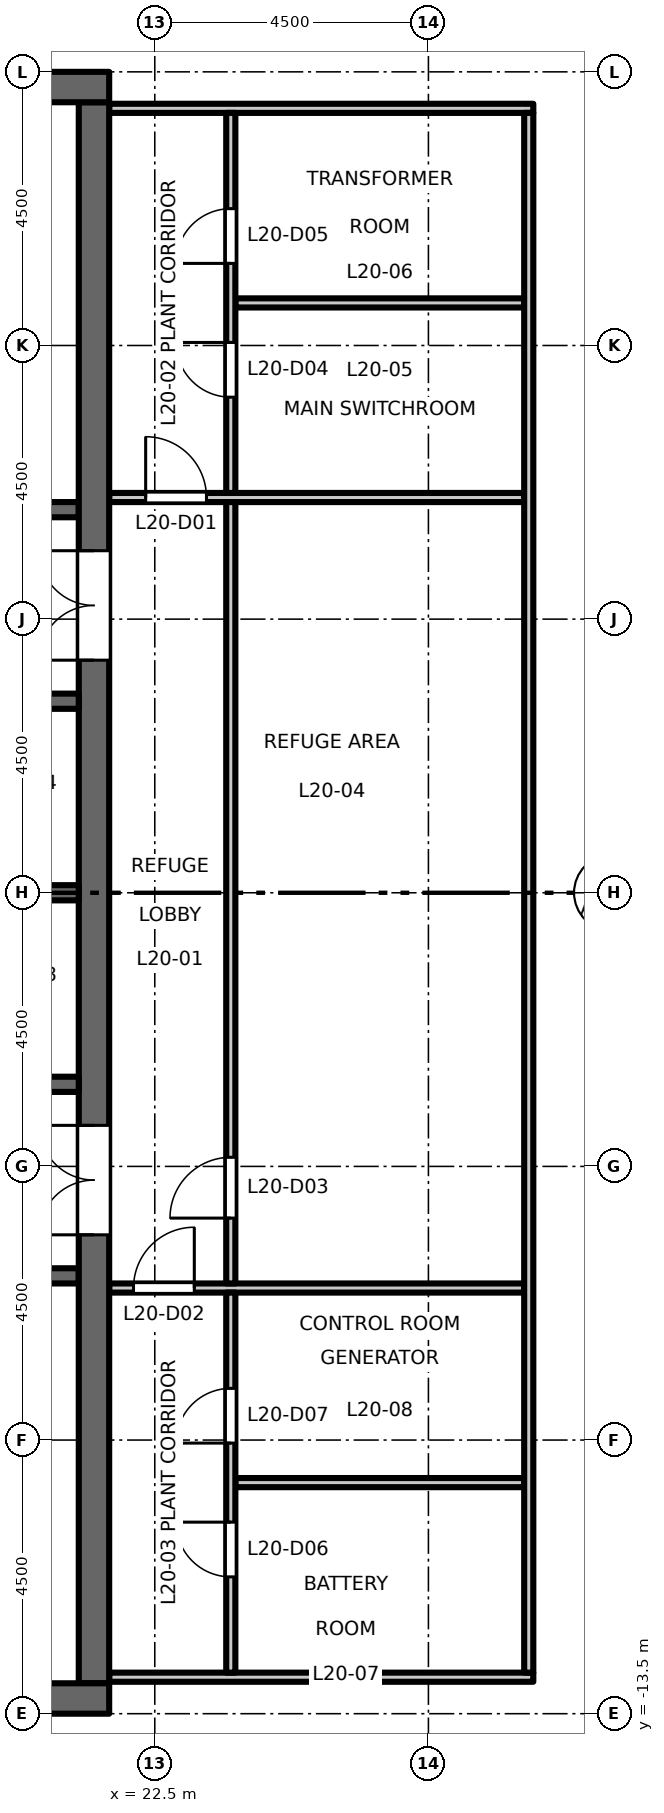
"""IFC4 building model, lengths in metres.
Left out: names, types, materials, properties, quantities, classifications, styles, units other than length and angle.
Written with IfcOpenShell. Run it as: python <this file> out.ifc"""

import sys

from ifc_helpers import new_model, si_unit, direction, frame, frame_2d, origin, place, context, subcontext, project, spatial, rectangle, extrude, element, fill, save


model = new_model("IFC4")
c1 = context("Model", 3, precision=1e-05, world=origin(), true_north=direction((0.0, 1.0)))
c2 = subcontext(c1, "Body", "Model", "MODEL_VIEW")
j1 = project(units=[si_unit("LENGTHUNIT", "METRE"), si_unit("PLANEANGLEUNIT", "RADIAN")], contexts=[c1])
p1 = place(None, origin())
s1 = spatial("IfcSite", under=j1, at=p1, CompositionType="ELEMENT")
p2 = place(p1, origin())
s2 = spatial("IfcBuilding", under=s1, at=p2, CompositionType="ELEMENT")
p3 = place(p2, frame((0.0, 0.0, 94.2)))
s3 = spatial("IfcBuildingStorey", under=s2, at=p3, CompositionType="ELEMENT", Elevation=94.2)
p4 = place(p3, frame((17.0, 6.3, 0.0), z_axis=(0.0, 0.0, 1.0), x_axis=(1.0, 0.0, 0.0)))
e1 = element("IfcWall", 1, at=p4, inside=s3, PredefinedType="SHEAR", context=c2, shape_type="SweptSolid", body=[
    extrude(rectangle(XDim=4.25, YDim=0.25, at=frame_2d((2.125, 0.0))), origin(), (0.0, 0.0, 1.0), 4.8),
])
p5 = place(p4, frame((1.8, 0.0, 0.0)))
e2 = element("IfcOpeningElement", 2, at=p5, cuts=e1, PredefinedType="OPENING", context=c2, shape_type="SweptSolid", body=[
    extrude(rectangle(XDim=0.9, YDim=2.1, at=frame_2d((0.45, 1.05))), frame((0.0, 0.135, 0.0), z_axis=(0.0, -1.0, 0.0), x_axis=(1.0, 0.0, 0.0)), (0.0, 0.0, 1.0), 0.27),
])
p6 = place(p3, frame((12.15, -6.3, 0.0), z_axis=(0.0, 0.0, 1.0), x_axis=(1.0, 0.0, 0.0)))
e3 = element("IfcWall", 3, at=p6, inside=s3, PredefinedType="SHEAR", context=c2, shape_type="SweptSolid", body=[
    extrude(rectangle(XDim=9.1, YDim=0.25, at=frame_2d((4.55, 0.0))), origin(), (0.0, 0.0, 1.0), 4.8),
])
p7 = place(p6, frame((1.8, 0.0, 0.0)))
e4 = element("IfcOpeningElement", 4, at=p7, cuts=e3, PredefinedType="OPENING", context=c2, shape_type="SweptSolid", body=[
    extrude(rectangle(XDim=1.0, YDim=2.1, at=frame_2d((0.5, 1.05))), frame((0.0, 0.135, 0.0), z_axis=(0.0, -1.0, 0.0), x_axis=(1.0, 0.0, 0.0)), (0.0, 0.0, 1.0), 0.27),
])
p8 = place(p6, frame((7.65, 0.0, 0.0)))
e5 = element("IfcOpeningElement", 5, at=p8, cuts=e3, PredefinedType="OPENING", context=c2, shape_type="SweptSolid", body=[
    extrude(rectangle(XDim=0.9, YDim=2.1, at=frame_2d((0.45, 1.05))), frame((0.0, 0.135, 0.0), z_axis=(0.0, -1.0, 0.0), x_axis=(1.0, 0.0, 0.0)), (0.0, 0.0, 1.0), 0.27),
])
p9 = place(p3, frame((21.5, -13.0, 0.0), z_axis=(0.0, 0.0, 1.0), x_axis=(0.0, 1.0, 0.0)))
e6 = element("IfcWall", 6, at=p9, inside=s3, PredefinedType="SHEAR", context=c2, shape_type="SweptSolid", body=[
    extrude(rectangle(XDim=26.0, YDim=0.5, at=frame_2d((13.0, 0.0))), origin(), (0.0, 0.0, 1.0), 4.8),
])
p10 = place(p9, frame((16.825, 0.0, 0.0)))
e7 = element("IfcOpeningElement", 7, at=p10, cuts=e6, PredefinedType="OPENING", context=c2, shape_type="SweptSolid", body=[
    extrude(rectangle(XDim=1.8, YDim=2.1, at=frame_2d((0.9, 1.05))), frame((0.0, 0.26, 0.0), z_axis=(0.0, -1.0, 0.0), x_axis=(1.0, 0.0, 0.0)), (0.0, 0.0, 1.0), 0.52),
])
p11 = place(p9, frame((7.375, 0.0, 0.0)))
e8 = element("IfcOpeningElement", 8, at=p11, cuts=e6, PredefinedType="OPENING", context=c2, shape_type="SweptSolid", body=[
    extrude(rectangle(XDim=1.8, YDim=2.1, at=frame_2d((0.9, 1.05))), frame((0.0, 0.26, 0.0), z_axis=(0.0, -1.0, 0.0), x_axis=(1.0, 0.0, 0.0)), (0.0, 0.0, 1.0), 0.52),
])
for number, where, z_axis, x_axis in (
    (9, (17.05, 0.0, 0.0), (0.0, 0.0, 1.0), (1.0, 0.0, 0.0)),
    (10, (17.05, 3.15, 0.0), (0.0, 0.0, 1.0), (1.0, 0.0, 0.0)),
    (11, (17.05, -3.15, 0.0), (0.0, 0.0, 1.0), (1.0, 0.0, 0.0)),
):
    element("IfcWall", number, at=place(p3, frame(where, z_axis=z_axis, x_axis=x_axis)), inside=s3, PredefinedType="SHEAR", context=c2, shape_type="SweptSolid", body=[
        extrude(rectangle(XDim=4.2, YDim=0.25, at=frame_2d((2.1, 0.0))), origin(), (0.0, 0.0, 1.0), 4.8),
    ])
for number, where, z_axis, x_axis in (
    (12, (8.25, 13.25, 0.0), (0.0, 0.0, 1.0), (1.0, 0.0, 0.0)),
    (13, (8.25, -13.25, 0.0), (0.0, 0.0, 1.0), (1.0, 0.0, 0.0)),
):
    element("IfcWall", number, at=place(p3, frame(where, z_axis=z_axis, x_axis=x_axis)), inside=s3, PredefinedType="SHEAR", context=c2, shape_type="SweptSolid", body=[
        extrude(rectangle(XDim=13.5, YDim=0.5, at=frame_2d((6.75, 0.0))), origin(), (0.0, 0.0, 1.0), 4.8),
    ])
p12 = place(p3, frame((21.75, -12.9, 0.0), z_axis=(0.0, 0.0, 1.0), x_axis=(1.0, 0.0, 0.0)))
e14 = element("IfcWall", 14, at=p12, inside=s3, PredefinedType="PARTITIONING", context=c2, shape_type="SweptSolid", body=[
    extrude(rectangle(XDim=6.975, YDim=0.15, at=frame_2d((3.488, 0.0))), origin(), (0.0, 0.0, 1.0), 4.8),
])
p13 = place(p3, frame((23.825, -9.7, 0.0), z_axis=(0.0, 0.0, 1.0), x_axis=(1.0, 0.0, 0.0)))
e15 = element("IfcWall", 15, at=p13, inside=s3, PredefinedType="PARTITIONING", context=c2, shape_type="SweptSolid", body=[
    extrude(rectangle(XDim=4.75, YDim=0.15, at=frame_2d((2.375, 0.0))), origin(), (0.0, 0.0, 1.0), 4.8),
])
p14 = place(p3, frame((21.75, -6.5, 0.0), z_axis=(0.0, 0.0, 1.0), x_axis=(1.0, 0.0, 0.0)))
e16 = element("IfcWall", 16, at=p14, inside=s3, PredefinedType="PARTITIONING", context=c2, shape_type="SweptSolid", body=[
    extrude(rectangle(XDim=6.825, YDim=0.15, at=frame_2d((3.413, 0.0))), origin(), (0.0, 0.0, 1.0), 4.8),
])
p15 = place(p14, frame((0.4, 0.0, 0.0)))
e17 = element("IfcOpeningElement", 17, at=p15, cuts=e16, PredefinedType="OPENING", context=c2, shape_type="SweptSolid", body=[
    extrude(rectangle(XDim=1.0, YDim=2.1, at=frame_2d((0.5, 1.05))), frame((0.0, 0.085, 0.0), z_axis=(0.0, -1.0, 0.0), x_axis=(1.0, 0.0, 0.0)), (0.0, 0.0, 1.0), 0.17),
])
p16 = place(p3, frame((21.75, 6.5, 0.0), z_axis=(0.0, 0.0, 1.0), x_axis=(1.0, 0.0, 0.0)))
e18 = element("IfcWall", 18, at=p16, inside=s3, PredefinedType="PARTITIONING", context=c2, shape_type="SweptSolid", body=[
    extrude(rectangle(XDim=6.825, YDim=0.15, at=frame_2d((3.413, 0.0))), origin(), (0.0, 0.0, 1.0), 4.8),
])
p17 = place(p16, frame((0.6, 0.0, 0.0)))
e19 = element("IfcOpeningElement", 19, at=p17, cuts=e18, PredefinedType="OPENING", context=c2, shape_type="SweptSolid", body=[
    extrude(rectangle(XDim=1.0, YDim=2.1, at=frame_2d((0.5, 1.05))), frame((0.0, 0.085, 0.0), z_axis=(0.0, -1.0, 0.0), x_axis=(1.0, 0.0, 0.0)), (0.0, 0.0, 1.0), 0.17),
])
p18 = place(p3, frame((23.825, 9.7, 0.0), z_axis=(0.0, 0.0, 1.0), x_axis=(1.0, 0.0, 0.0)))
e20 = element("IfcWall", 20, at=p18, inside=s3, PredefinedType="PARTITIONING", context=c2, shape_type="SweptSolid", body=[
    extrude(rectangle(XDim=4.75, YDim=0.15, at=frame_2d((2.375, 0.0))), origin(), (0.0, 0.0, 1.0), 4.8),
])
p19 = place(p3, frame((21.75, 12.9, 0.0), z_axis=(0.0, 0.0, 1.0), x_axis=(1.0, 0.0, 0.0)))
e21 = element("IfcWall", 21, at=p19, inside=s3, PredefinedType="PARTITIONING", context=c2, shape_type="SweptSolid", body=[
    extrude(rectangle(XDim=6.975, YDim=0.15, at=frame_2d((3.488, 0.0))), origin(), (0.0, 0.0, 1.0), 4.8),
])
p20 = place(p3, frame((23.75, -12.825, 0.0), z_axis=(0.0, 0.0, 1.0), x_axis=(0.0, 1.0, 0.0)))
e22 = element("IfcWall", 22, at=p20, inside=s3, PredefinedType="PARTITIONING", context=c2, shape_type="SweptSolid", body=[
    extrude(rectangle(XDim=6.25, YDim=0.15, at=frame_2d((3.125, 0.0))), origin(), (0.0, 0.0, 1.0), 4.8),
])
p21 = place(p20, frame((1.575, 0.0, 0.0)))
e23 = element("IfcOpeningElement", 23, at=p21, cuts=e22, PredefinedType="OPENING", context=c2, shape_type="SweptSolid", body=[
    extrude(rectangle(XDim=0.9, YDim=2.1, at=frame_2d((0.45, 1.05))), frame((0.0, 0.085, 0.0), z_axis=(0.0, -1.0, 0.0), x_axis=(1.0, 0.0, 0.0)), (0.0, 0.0, 1.0), 0.17),
])
p22 = place(p20, frame((3.775, 0.0, 0.0)))
e24 = element("IfcOpeningElement", 24, at=p22, cuts=e22, PredefinedType="OPENING", context=c2, shape_type="SweptSolid", body=[
    extrude(rectangle(XDim=0.9, YDim=2.1, at=frame_2d((0.45, 1.05))), frame((0.0, 0.085, 0.0), z_axis=(0.0, -1.0, 0.0), x_axis=(1.0, 0.0, 0.0)), (0.0, 0.0, 1.0), 0.17),
])
p23 = place(p3, frame((23.75, -6.425, 0.0), z_axis=(0.0, 0.0, 1.0), x_axis=(0.0, 1.0, 0.0)))
e25 = element("IfcWall", 25, at=p23, inside=s3, PredefinedType="PARTITIONING", context=c2, shape_type="SweptSolid", body=[
    extrude(rectangle(XDim=12.85, YDim=0.15, at=frame_2d((6.425, 0.0))), origin(), (0.0, 0.0, 1.0), 4.8),
])
p24 = place(p23, frame((1.075, 0.0, 0.0)))
e26 = element("IfcOpeningElement", 26, at=p24, cuts=e25, PredefinedType="OPENING", context=c2, shape_type="SweptSolid", body=[
    extrude(rectangle(XDim=1.0, YDim=2.1, at=frame_2d((0.5, 1.05))), frame((0.0, 0.085, 0.0), z_axis=(0.0, -1.0, 0.0), x_axis=(1.0, 0.0, 0.0)), (0.0, 0.0, 1.0), 0.17),
])
p25 = place(p3, frame((23.75, 6.575, 0.0), z_axis=(0.0, 0.0, 1.0), x_axis=(0.0, 1.0, 0.0)))
e27 = element("IfcWall", 27, at=p25, inside=s3, PredefinedType="PARTITIONING", context=c2, shape_type="SweptSolid", body=[
    extrude(rectangle(XDim=6.25, YDim=0.15, at=frame_2d((3.125, 0.0))), origin(), (0.0, 0.0, 1.0), 4.8),
])
p26 = place(p25, frame((1.575, 0.0, 0.0)))
e28 = element("IfcOpeningElement", 28, at=p26, cuts=e27, PredefinedType="OPENING", context=c2, shape_type="SweptSolid", body=[
    extrude(rectangle(XDim=0.9, YDim=2.1, at=frame_2d((0.45, 1.05))), frame((0.0, 0.085, 0.0), z_axis=(0.0, -1.0, 0.0), x_axis=(1.0, 0.0, 0.0)), (0.0, 0.0, 1.0), 0.17),
])
p27 = place(p25, frame((3.775, 0.0, 0.0)))
e29 = element("IfcOpeningElement", 29, at=p27, cuts=e27, PredefinedType="OPENING", context=c2, shape_type="SweptSolid", body=[
    extrude(rectangle(XDim=0.9, YDim=2.1, at=frame_2d((0.45, 1.05))), frame((0.0, 0.085, 0.0), z_axis=(0.0, -1.0, 0.0), x_axis=(1.0, 0.0, 0.0)), (0.0, 0.0, 1.0), 0.17),
])
p28 = place(p3, frame((28.65, -12.825, 0.0), z_axis=(0.0, 0.0, 1.0), x_axis=(0.0, 1.0, 0.0)))
e30 = element("IfcWall", 30, at=p28, inside=s3, PredefinedType="PARTITIONING", context=c2, shape_type="SweptSolid", body=[
    extrude(rectangle(XDim=25.65, YDim=0.15, at=frame_2d((12.825, 0.0))), origin(), (0.0, 0.0, 1.0), 4.8),
])
p29 = place(p10, origin())
e31 = element("IfcDoor", 31, at=p29, inside=s3, OperationType="DOUBLE_DOOR_DOUBLE_SWING", PredefinedType="DOOR", context=c2, shape_type="SweptSolid", body=[
    extrude(rectangle(XDim=1.8, YDim=2.1, at=frame_2d((0.9, 1.05))), frame((0.0, 0.025, 0.0), z_axis=(0.0, -1.0, 0.0), x_axis=(1.0, 0.0, 0.0)), (0.0, 0.0, 1.0), 0.05),
])
fill(e7, e31)
p30 = place(p11, origin())
e32 = element("IfcDoor", 32, at=p30, inside=s3, OperationType="DOUBLE_DOOR_DOUBLE_SWING", PredefinedType="DOOR", context=c2, shape_type="SweptSolid", body=[
    extrude(rectangle(XDim=1.8, YDim=2.1, at=frame_2d((0.9, 1.05))), frame((0.0, 0.025, 0.0), z_axis=(0.0, -1.0, 0.0), x_axis=(1.0, 0.0, 0.0)), (0.0, 0.0, 1.0), 0.05),
])
fill(e8, e32)
p31 = place(p17, origin())
e33 = element("IfcDoor", 33, at=p31, inside=s3, OperationType="SINGLE_SWING_LEFT", PredefinedType="DOOR", context=c2, shape_type="SweptSolid", body=[
    extrude(rectangle(XDim=1.0, YDim=2.1, at=frame_2d((0.5, 1.05))), frame((0.0, 0.025, 0.0), z_axis=(0.0, -1.0, 0.0), x_axis=(1.0, 0.0, 0.0)), (0.0, 0.0, 1.0), 0.05),
])
fill(e19, e33)
p32 = place(p15, origin())
e34 = element("IfcDoor", 34, at=p32, inside=s3, OperationType="SINGLE_SWING_RIGHT", PredefinedType="DOOR", context=c2, shape_type="SweptSolid", body=[
    extrude(rectangle(XDim=1.0, YDim=2.1, at=frame_2d((0.5, 1.05))), frame((0.0, 0.025, 0.0), z_axis=(0.0, -1.0, 0.0), x_axis=(1.0, 0.0, 0.0)), (0.0, 0.0, 1.0), 0.05),
])
fill(e17, e34)
p33 = place(p24, origin())
e35 = element("IfcDoor", 35, at=p33, inside=s3, OperationType="SINGLE_SWING_LEFT", PredefinedType="DOOR", context=c2, shape_type="SweptSolid", body=[
    extrude(rectangle(XDim=1.0, YDim=2.1, at=frame_2d((0.5, 1.05))), frame((0.0, 0.025, 0.0), z_axis=(0.0, -1.0, 0.0), x_axis=(1.0, 0.0, 0.0)), (0.0, 0.0, 1.0), 0.05),
])
fill(e26, e35)
p34 = place(p26, origin())
e36 = element("IfcDoor", 36, at=p34, inside=s3, OperationType="SINGLE_SWING_RIGHT", PredefinedType="DOOR", context=c2, shape_type="SweptSolid", body=[
    extrude(rectangle(XDim=0.9, YDim=2.1, at=frame_2d((0.45, 1.05))), frame((0.0, 0.025, 0.0), z_axis=(0.0, -1.0, 0.0), x_axis=(1.0, 0.0, 0.0)), (0.0, 0.0, 1.0), 0.05),
])
fill(e28, e36)
p35 = place(p27, origin())
e37 = element("IfcDoor", 37, at=p35, inside=s3, OperationType="SINGLE_SWING_LEFT", PredefinedType="DOOR", context=c2, shape_type="SweptSolid", body=[
    extrude(rectangle(XDim=0.9, YDim=2.1, at=frame_2d((0.45, 1.05))), frame((0.0, 0.025, 0.0), z_axis=(0.0, -1.0, 0.0), x_axis=(1.0, 0.0, 0.0)), (0.0, 0.0, 1.0), 0.05),
])
fill(e29, e37)
p36 = place(p21, origin())
e38 = element("IfcDoor", 38, at=p36, inside=s3, OperationType="SINGLE_SWING_RIGHT", PredefinedType="DOOR", context=c2, shape_type="SweptSolid", body=[
    extrude(rectangle(XDim=0.9, YDim=2.1, at=frame_2d((0.45, 1.05))), frame((0.0, 0.025, 0.0), z_axis=(0.0, -1.0, 0.0), x_axis=(1.0, 0.0, 0.0)), (0.0, 0.0, 1.0), 0.05),
])
fill(e23, e38)
p37 = place(p22, origin())
e39 = element("IfcDoor", 39, at=p37, inside=s3, OperationType="SINGLE_SWING_LEFT", PredefinedType="DOOR", context=c2, shape_type="SweptSolid", body=[
    extrude(rectangle(XDim=0.9, YDim=2.1, at=frame_2d((0.45, 1.05))), frame((0.0, 0.025, 0.0), z_axis=(0.0, -1.0, 0.0), x_axis=(1.0, 0.0, 0.0)), (0.0, 0.0, 1.0), 0.05),
])
fill(e24, e39)
save(model, sys.argv[1])
